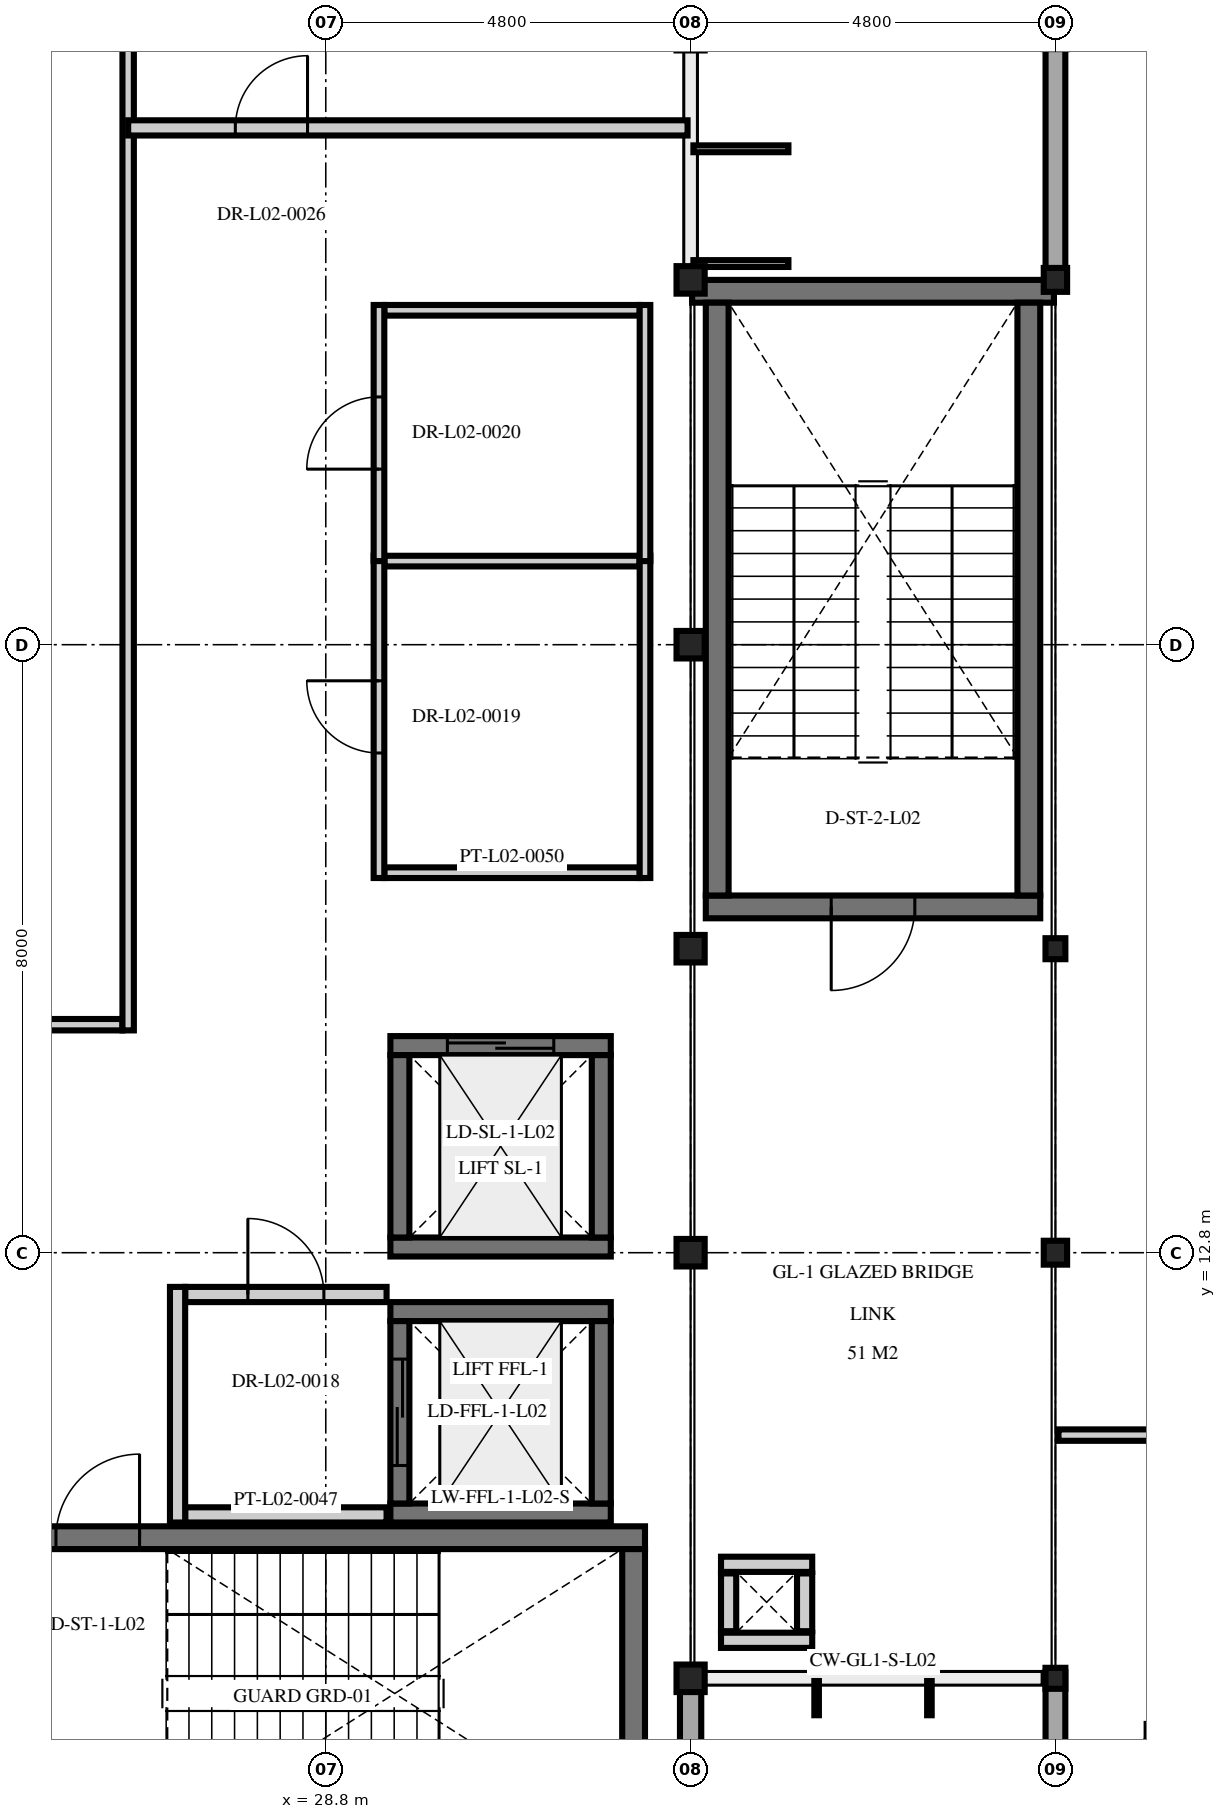
"""IFC4 building model, lengths in metres.
Left out: names, types, materials, properties, quantities, classifications, styles, units other than length and angle.
Written with IfcOpenShell. Run it as: python <this file> out.ifc"""

import sys

from ifc_helpers import new_model, si_unit, direction, frame, frame_2d, origin, origin_2d, place, context, subcontext, project, spatial, rectangle, i_section, extrude, element, fill, save


model = new_model("IFC4")
c1 = context("Model", 3, precision=1e-05, world=origin(), true_north=direction((0.0, 1.0)))
c2 = subcontext(c1, "Body", "Model", "MODEL_VIEW")
j1 = project(units=[si_unit("LENGTHUNIT", "METRE"), si_unit("PLANEANGLEUNIT", "RADIAN")], contexts=[c1])
p1 = place(None, origin())
s1 = spatial("IfcSite", under=j1, at=p1, CompositionType="ELEMENT")
p2 = place(p1, origin())
s2 = spatial("IfcBuilding", under=s1, at=p2, CompositionType="ELEMENT")
p3 = place(p2, frame((0.0, 0.0, 9.6)))
s3 = spatial("IfcBuildingStorey", under=s2, at=p3, CompositionType="ELEMENT", Elevation=9.6)
for number, where, z_axis, x_axis in (
    (1, (33.6, 7.2, 0.0), (0.0, 0.0, 1.0), (1.0, 0.0, 0.0)),
    (2, (33.6, 12.8, 0.0), (0.0, 0.0, 1.0), (1.0, 0.0, 0.0)),
    (3, (33.6, 16.8, 0.0), (0.0, 0.0, 1.0), (1.0, 0.0, 0.0)),
    (4, (33.6, 20.8, 0.0), (0.0, 0.0, 1.0), (1.0, 0.0, 0.0)),
    (5, (33.6, 25.6, 0.0), (0.0, 0.0, 1.0), (1.0, 0.0, 0.0)),
):
    element("IfcColumn", number, at=place(p3, frame(where, z_axis=z_axis, x_axis=x_axis)), inside=s3, PredefinedType="COLUMN", context=c2, shape_type="SweptSolid", body=[
        extrude(i_section(OverallWidth=0.371, OverallDepth=0.362, WebThickness=0.012, FlangeThickness=0.021, at=origin_2d()), origin(), (0.0, 0.0, 1.0), 4.5),
    ])
for number, where, z_axis, x_axis in (
    (6, (38.4, 12.8, 0.0), (0.0, 0.0, 1.0), (1.0, 0.0, 0.0)),
    (7, (38.4, 25.6, 0.0), (0.0, 0.0, 1.0), (1.0, 0.0, 0.0)),
):
    element("IfcColumn", number, at=place(p3, frame(where, z_axis=z_axis, x_axis=x_axis)), inside=s3, PredefinedType="COLUMN", context=c2, shape_type="SweptSolid", body=[
        extrude(i_section(OverallWidth=0.307, OverallDepth=0.314, WebThickness=0.012, FlangeThickness=0.019, at=origin_2d()), origin(), (0.0, 0.0, 1.0), 4.5),
    ])
for number, where, z_axis, x_axis in (
    (8, (38.4, 7.2, 0.0), (0.0, 0.0, 1.0), (1.0, 0.0, 0.0)),
    (9, (38.4, 16.8, 0.0), (0.0, 0.0, 1.0), (1.0, 0.0, 0.0)),
):
    element("IfcColumn", number, at=place(p3, frame(where, z_axis=z_axis, x_axis=x_axis)), inside=s3, PredefinedType="COLUMN", context=c2, shape_type="SweptSolid", body=[
        extrude(i_section(OverallWidth=0.261, OverallDepth=0.276, WebThickness=0.015, FlangeThickness=0.025, at=origin_2d()), origin(), (0.0, 0.0, 1.0), 4.5),
    ])
p4 = place(p3, frame((24.6, 9.05, 0.0), z_axis=(0.0, 0.0, 1.0), x_axis=(1.0, 0.0, 0.0)))
e10 = element("IfcWall", 10, at=p4, inside=s3, PredefinedType="SHEAR", context=c2, shape_type="SweptSolid", body=[
    extrude(rectangle(XDim=8.4, YDim=0.3, at=frame_2d((4.2, 0.0))), origin(), (0.0, 0.0, 1.0), 4.26),
])
p5 = place(p4, frame((0.65, 0.0, 0.0)))
e11 = element("IfcOpeningElement", 11, at=p5, cuts=e10, PredefinedType="OPENING", context=c2, shape_type="SweptSolid", body=[
    extrude(rectangle(XDim=1.1, YDim=2.2, at=frame_2d((0.55, 1.1))), frame((0.0, 0.16, 0.0), z_axis=(0.0, -1.0, 0.0), x_axis=(1.0, 0.0, 0.0)), (0.0, 0.0, 1.0), 0.32),
])
p6 = place(p3, frame((32.85, 8.9, 0.0), z_axis=(0.0, 0.0, 1.0), x_axis=(0.0, -1.0, 0.0)))
e12 = element("IfcWall", 12, at=p6, inside=s3, PredefinedType="SHEAR", context=c2, shape_type="SweptSolid", body=[
    extrude(rectangle(XDim=3.8, YDim=0.3, at=frame_2d((1.9, 0.0))), origin(), (0.0, 0.0, 1.0), 4.26),
])
p7 = place(p3, frame((38.2, 17.35, 0.0), z_axis=(0.0, 0.0, 1.0), x_axis=(-1.0, 0.0, 0.0)))
e13 = element("IfcWall", 13, at=p7, inside=s3, PredefinedType="SHEAR", context=c2, shape_type="SweptSolid", body=[
    extrude(rectangle(XDim=4.4, YDim=0.3, at=frame_2d((2.2, 0.0))), origin(), (0.0, 0.0, 1.0), 4.26),
])
p8 = place(p7, frame((1.65, 0.0, 0.0)))
e14 = element("IfcOpeningElement", 14, at=p8, cuts=e13, PredefinedType="OPENING", context=c2, shape_type="SweptSolid", body=[
    extrude(rectangle(XDim=1.1, YDim=2.2, at=frame_2d((0.55, 1.1))), frame((0.0, 0.16, 0.0), z_axis=(0.0, -1.0, 0.0), x_axis=(1.0, 0.0, 0.0)), (0.0, 0.0, 1.0), 0.32),
])
p9 = place(p3, frame((33.62, 25.45, 0.0), z_axis=(0.0, 0.0, 1.0), x_axis=(1.0, 0.0, 0.0)))
e15 = element("IfcWall", 15, at=p9, inside=s3, PredefinedType="SHEAR", context=c2, shape_type="SweptSolid", body=[
    extrude(rectangle(XDim=4.76, YDim=0.3, at=frame_2d((2.38, 0.0))), origin(), (0.0, 0.0, 1.0), 4.26),
])
for number, where, z_axis, x_axis in (
    (16, (33.95, 17.5, 0.0), (0.0, 0.0, 1.0), (0.0, 1.0, 0.0)),
    (17, (38.05, 25.3, 0.0), (0.0, 0.0, 1.0), (0.0, -1.0, 0.0)),
):
    element("IfcWall", number, at=place(p3, frame(where, z_axis=z_axis, x_axis=x_axis)), inside=s3, PredefinedType="SHEAR", context=c2, shape_type="SweptSolid", body=[
        extrude(rectangle(XDim=7.8, YDim=0.3, at=frame_2d((3.9, 0.0))), origin(), (0.0, 0.0, 1.0), 4.26),
    ])
for number, where, z_axis, x_axis in (
    (18, (32.55, 9.375, 0.0), (0.0, 0.0, 1.0), (-1.0, 0.0, 0.0)),
    (19, (29.65, 12.025, 0.0), (0.0, 0.0, 1.0), (1.0, 0.0, 0.0)),
):
    element("IfcWall", number, at=place(p3, frame(where, z_axis=z_axis, x_axis=x_axis)), inside=s3, PredefinedType="SHEAR", context=c2, shape_type="SweptSolid", body=[
        extrude(rectangle(XDim=2.9, YDim=0.25, at=frame_2d((1.45, 0.0))), origin(), (0.0, 0.0, 1.0), 4.26),
    ])
p10 = place(p3, frame((29.775, 9.5, 0.0), z_axis=(0.0, 0.0, 1.0), x_axis=(0.0, 1.0, 0.0)))
e20 = element("IfcWall", 20, at=p10, inside=s3, PredefinedType="SHEAR", context=c2, shape_type="SweptSolid", body=[
    extrude(rectangle(XDim=2.4, YDim=0.25, at=frame_2d((1.2, 0.0))), origin(), (0.0, 0.0, 1.0), 4.26),
])
p11 = place(p10, frame((0.5, 0.0, 0.0)))
e21 = element("IfcOpeningElement", 21, at=p11, cuts=e20, PredefinedType="OPENING", context=c2, shape_type="SweptSolid", body=[
    extrude(rectangle(XDim=1.4, YDim=2.2, at=frame_2d((0.7, 1.1))), frame((0.0, 0.135, 0.0), z_axis=(0.0, -1.0, 0.0), x_axis=(1.0, 0.0, 0.0)), (0.0, 0.0, 1.0), 0.27),
])
p12 = place(p3, frame((32.425, 11.9, 0.0), z_axis=(0.0, 0.0, 1.0), x_axis=(0.0, -1.0, 0.0)))
e22 = element("IfcWall", 22, at=p12, inside=s3, PredefinedType="SHEAR", context=c2, shape_type="SweptSolid", body=[
    extrude(rectangle(XDim=2.4, YDim=0.25, at=frame_2d((1.2, 0.0))), origin(), (0.0, 0.0, 1.0), 4.26),
])
p13 = place(p3, frame((32.55, 12.875, 0.0), z_axis=(0.0, 0.0, 1.0), x_axis=(-1.0, 0.0, 0.0)))
e23 = element("IfcWall", 23, at=p13, inside=s3, PredefinedType="SHEAR", context=c2, shape_type="SweptSolid", body=[
    extrude(rectangle(XDim=2.9, YDim=0.25, at=frame_2d((1.45, 0.0))), origin(), (0.0, 0.0, 1.0), 4.26),
])
p14 = place(p3, frame((29.65, 15.525, 0.0), z_axis=(0.0, 0.0, 1.0), x_axis=(1.0, 0.0, 0.0)))
e24 = element("IfcWall", 24, at=p14, inside=s3, PredefinedType="SHEAR", context=c2, shape_type="SweptSolid", body=[
    extrude(rectangle(XDim=2.9, YDim=0.25, at=frame_2d((1.45, 0.0))), origin(), (0.0, 0.0, 1.0), 4.26),
])
p15 = place(p14, frame((0.75, 0.0, 0.0)))
e25 = element("IfcOpeningElement", 25, at=p15, cuts=e24, PredefinedType="OPENING", context=c2, shape_type="SweptSolid", body=[
    extrude(rectangle(XDim=1.4, YDim=2.2, at=frame_2d((0.7, 1.1))), frame((0.0, 0.135, 0.0), z_axis=(0.0, -1.0, 0.0), x_axis=(1.0, 0.0, 0.0)), (0.0, 0.0, 1.0), 0.27),
])
for number, where, z_axis, x_axis in (
    (26, (29.775, 13.0, 0.0), (0.0, 0.0, 1.0), (0.0, 1.0, 0.0)),
    (27, (32.425, 15.4, 0.0), (0.0, 0.0, 1.0), (0.0, -1.0, 0.0)),
):
    element("IfcWall", number, at=place(p3, frame(where, z_axis=z_axis, x_axis=x_axis)), inside=s3, PredefinedType="SHEAR", context=c2, shape_type="SweptSolid", body=[
        extrude(rectangle(XDim=2.4, YDim=0.25, at=frame_2d((1.2, 0.0))), origin(), (0.0, 0.0, 1.0), 4.26),
    ])
for number, where, z_axis, x_axis in (
    (28, (35.2, 7.7, 0.0), (0.0, 0.0, 1.0), (-1.0, 0.0, 0.0)),
    (29, (34.0, 8.7, 0.0), (0.0, 0.0, 1.0), (1.0, 0.0, 0.0)),
):
    element("IfcWall", number, at=place(p3, frame(where, z_axis=z_axis, x_axis=x_axis)), inside=s3, PredefinedType="PARTITIONING", context=c2, shape_type="SweptSolid", body=[
        extrude(rectangle(XDim=1.2, YDim=0.2, at=frame_2d((0.6, 0.0))), origin(), (0.0, 0.0, 1.0), 3.76),
    ])
for number, where, z_axis, x_axis in (
    (30, (34.1, 7.82, 0.0), (0.0, 0.0, 1.0), (0.0, 1.0, 0.0)),
    (31, (35.1, 8.58, 0.0), (0.0, 0.0, 1.0), (0.0, -1.0, 0.0)),
):
    element("IfcWall", number, at=place(p3, frame(where, z_axis=z_axis, x_axis=x_axis)), inside=s3, PredefinedType="PARTITIONING", context=c2, shape_type="SweptSolid", body=[
        extrude(rectangle(XDim=0.76, YDim=0.2, at=frame_2d((0.38, 0.0))), origin(), (0.0, 0.0, 1.0), 3.76),
    ])
p16 = place(p3, frame((33.6, 7.285, 0.0), z_axis=(0.0, 0.0, 1.0), x_axis=(0.0, -1.0, 0.0)))
e32 = element("IfcWall", 32, at=p16, inside=s3, PredefinedType="SOLIDWALL", context=c2, shape_type="SweptSolid", body=[
    extrude(rectangle(XDim=2.57, YDim=0.28, at=frame_2d((1.285, 0.0))), origin(), (0.0, 0.0, 1.0), 3.685),
])
p17 = place(p3, frame((38.4, 4.715, 0.0), z_axis=(0.0, 0.0, 1.0), x_axis=(0.0, 1.0, 0.0)))
e33 = element("IfcWall", 33, at=p17, inside=s3, PredefinedType="SOLIDWALL", context=c2, shape_type="SweptSolid", body=[
    extrude(rectangle(XDim=2.57, YDim=0.26, at=frame_2d((1.285, 0.0))), origin(), (0.0, 0.0, 1.0), 3.845),
])
p18 = place(p3, frame((38.4, 25.515, 0.0), z_axis=(0.0, 0.0, 1.0), x_axis=(0.0, 1.0, 0.0)))
e34 = element("IfcWall", 34, at=p18, inside=s3, PredefinedType="SOLIDWALL", context=c2, shape_type="SweptSolid", body=[
    extrude(rectangle(XDim=11.37, YDim=0.26, at=frame_2d((5.685, 0.0))), origin(), (0.0, 0.0, 1.0), 3.845),
])
p19 = place(p3, frame((26.95, 9.35, 0.0), z_axis=(0.0, 0.0, 1.0), x_axis=(1.0, 0.0, 0.0)))
e35 = element("IfcWall", 35, at=p19, inside=s3, PredefinedType="PARTITIONING", context=c2, shape_type="SweptSolid", body=[
    extrude(rectangle(XDim=2.65, YDim=0.2, at=frame_2d((1.325, 0.0))), origin(), (0.0, 0.0, 1.0), 4.26),
])
p20 = place(p3, frame((26.95, 12.25, 0.0), z_axis=(0.0, 0.0, 1.0), x_axis=(1.0, 0.0, 0.0)))
e36 = element("IfcWall", 36, at=p20, inside=s3, PredefinedType="PARTITIONING", context=c2, shape_type="SweptSolid", body=[
    extrude(rectangle(XDim=2.65, YDim=0.2, at=frame_2d((1.325, 0.0))), origin(), (0.0, 0.0, 1.0), 4.26),
])
p21 = place(p20, frame((0.825, 0.0, 0.0)))
e37 = element("IfcOpeningElement", 37, at=p21, cuts=e36, PredefinedType="OPENING", context=c2, shape_type="SweptSolid", body=[
    extrude(rectangle(XDim=1.0, YDim=2.2, at=frame_2d((0.5, 1.1))), frame((0.0, 0.11, 0.0), z_axis=(0.0, -1.0, 0.0), x_axis=(1.0, 0.0, 0.0)), (0.0, 0.0, 1.0), 0.22),
])
p22 = place(p3, frame((26.85, 9.25, 0.0), z_axis=(0.0, 0.0, 1.0), x_axis=(0.0, 1.0, 0.0)))
e38 = element("IfcWall", 38, at=p22, inside=s3, PredefinedType="PARTITIONING", context=c2, shape_type="SweptSolid", body=[
    extrude(rectangle(XDim=3.1, YDim=0.2, at=frame_2d((1.55, 0.0))), origin(), (0.0, 0.0, 1.0), 4.26),
])
for number, where, z_axis, x_axis in (
    (39, (29.57, 17.8, 0.0), (0.0, 0.0, 1.0), (1.0, 0.0, 0.0)),
    (40, (29.57, 21.9, 0.0), (0.0, 0.0, 1.0), (1.0, 0.0, 0.0)),
):
    element("IfcWall", number, at=place(p3, frame(where, z_axis=z_axis, x_axis=x_axis)), inside=s3, PredefinedType="PARTITIONING", context=c2, shape_type="SweptSolid", body=[
        extrude(rectangle(XDim=3.36, YDim=0.14, at=frame_2d((1.68, 0.0))), origin(), (0.0, 0.0, 1.0), 3.835),
    ])
p23 = place(p3, frame((29.5, 17.73, 0.0), z_axis=(0.0, 0.0, 1.0), x_axis=(0.0, 1.0, 0.0)))
e41 = element("IfcWall", 41, at=p23, inside=s3, PredefinedType="PARTITIONING", context=c2, shape_type="SweptSolid", body=[
    extrude(rectangle(XDim=4.24, YDim=0.14, at=frame_2d((2.12, 0.0))), origin(), (0.0, 0.0, 1.0), 3.685),
])
p24 = place(p23, frame((1.645, 0.0, 0.0)))
e42 = element("IfcOpeningElement", 42, at=p24, cuts=e41, PredefinedType="OPENING", context=c2, shape_type="SweptSolid", body=[
    extrude(rectangle(XDim=0.95, YDim=2.1, at=frame_2d((0.475, 1.05))), frame((0.0, 0.08, 0.0), z_axis=(0.0, -1.0, 0.0), x_axis=(1.0, 0.0, 0.0)), (0.0, 0.0, 1.0), 0.16),
])
p25 = place(p3, frame((33.0, 17.73, 0.0), z_axis=(0.0, 0.0, 1.0), x_axis=(0.0, 1.0, 0.0)))
e43 = element("IfcWall", 43, at=p25, inside=s3, PredefinedType="PARTITIONING", context=c2, shape_type="SweptSolid", body=[
    extrude(rectangle(XDim=4.24, YDim=0.14, at=frame_2d((2.12, 0.0))), origin(), (0.0, 0.0, 1.0), 3.685),
])
p26 = place(p3, frame((29.57, 25.2, 0.0), z_axis=(0.0, 0.0, 1.0), x_axis=(1.0, 0.0, 0.0)))
e44 = element("IfcWall", 44, at=p26, inside=s3, PredefinedType="PARTITIONING", context=c2, shape_type="SweptSolid", body=[
    extrude(rectangle(XDim=3.36, YDim=0.14, at=frame_2d((1.68, 0.0))), origin(), (0.0, 0.0, 1.0), 3.835),
])
p27 = place(p3, frame((29.5, 21.9, 0.0), z_axis=(0.0, 0.0, 1.0), x_axis=(0.0, 1.0, 0.0)))
e45 = element("IfcWall", 45, at=p27, inside=s3, PredefinedType="PARTITIONING", context=c2, shape_type="SweptSolid", body=[
    extrude(rectangle(XDim=3.37, YDim=0.14, at=frame_2d((1.685, 0.0))), origin(), (0.0, 0.0, 1.0), 4.26),
])
p28 = place(p27, frame((1.21, 0.0, 0.0)))
e46 = element("IfcOpeningElement", 46, at=p28, cuts=e45, PredefinedType="OPENING", context=c2, shape_type="SweptSolid", body=[
    extrude(rectangle(XDim=0.95, YDim=2.1, at=frame_2d((0.475, 1.05))), frame((0.0, 0.08, 0.0), z_axis=(0.0, -1.0, 0.0), x_axis=(1.0, 0.0, 0.0)), (0.0, 0.0, 1.0), 0.16),
])
p29 = place(p3, frame((33.0, 21.9, 0.0), z_axis=(0.0, 0.0, 1.0), x_axis=(0.0, 1.0, 0.0)))
e47 = element("IfcWall", 47, at=p29, inside=s3, PredefinedType="PARTITIONING", context=c2, shape_type="SweptSolid", body=[
    extrude(rectangle(XDim=3.37, YDim=0.14, at=frame_2d((1.685, 0.0))), origin(), (0.0, 0.0, 1.0), 4.26),
])
p30 = place(p3, frame((9.675, 15.8, 0.0), z_axis=(0.0, 0.0, 1.0), x_axis=(1.0, 0.0, 0.0)))
e48 = element("IfcWall", 48, at=p30, inside=s3, PredefinedType="PARTITIONING", context=c2, shape_type="SweptSolid", body=[
    extrude(rectangle(XDim=16.45, YDim=0.15, at=frame_2d((8.225, 0.0))), origin(), (0.0, 0.0, 1.0), 3.785),
])
p31 = place(p3, frame((26.2, 15.725, 0.0), z_axis=(0.0, 0.0, 1.0), x_axis=(0.0, 1.0, 0.0)))
e49 = element("IfcWall", 49, at=p31, inside=s3, PredefinedType="PARTITIONING", context=c2, shape_type="SweptSolid", body=[
    extrude(rectangle(XDim=21.035, YDim=0.15, at=frame_2d((10.518, 0.0))), origin(), (0.0, 0.0, 1.0), 3.685),
])
p32 = place(p3, frame((26.2, 27.6, 0.0), z_axis=(0.0, 0.0, 1.0), x_axis=(1.0, 0.0, 0.0)))
e50 = element("IfcWall", 50, at=p32, inside=s3, PredefinedType="PARTITIONING", context=c2, shape_type="SweptSolid", body=[
    extrude(rectangle(XDim=7.36, YDim=0.2, at=frame_2d((3.68, 0.0))), origin(), (0.0, 0.0, 1.0), 3.785),
])
p33 = place(p32, frame((1.41, 0.0, 0.0)))
e51 = element("IfcOpeningElement", 51, at=p33, cuts=e50, PredefinedType="OPENING", context=c2, shape_type="SweptSolid", body=[
    extrude(rectangle(XDim=0.95, YDim=2.15, at=frame_2d((0.475, 1.075))), frame((0.0, 0.11, 0.0), z_axis=(0.0, -1.0, 0.0), x_axis=(1.0, 0.0, 0.0)), (0.0, 0.0, 1.0), 0.22),
])
p34 = place(p3, frame((38.44, 10.4, 0.0), z_axis=(0.0, 0.0, 1.0), x_axis=(1.0, 0.0, 0.0)))
e52 = element("IfcWall", 52, at=p34, inside=s3, PredefinedType="PARTITIONING", context=c2, shape_type="SweptSolid", body=[
    extrude(rectangle(XDim=9.485, YDim=0.15, at=frame_2d((4.743, 0.0))), origin(), (0.0, 0.0, 1.0), 3.955),
])
p35 = place(p34, frame((4.268, 0.0, 0.0)))
e53 = element("IfcOpeningElement", 53, at=p35, cuts=e52, PredefinedType="OPENING", context=c2, shape_type="SweptSolid", body=[
    extrude(rectangle(XDim=0.95, YDim=2.15, at=frame_2d((0.475, 1.075))), frame((0.0, 0.085, 0.0), z_axis=(0.0, -1.0, 0.0), x_axis=(1.0, 0.0, 0.0)), (0.0, 0.0, 1.0), 0.17),
])
p36 = place(p5, origin())
e54 = element("IfcDoor", 54, at=p36, inside=s3, OperationType="SINGLE_SWING_RIGHT", PredefinedType="DOOR", context=c2, shape_type="SweptSolid", body=[
    extrude(rectangle(XDim=1.1, YDim=2.2, at=frame_2d((0.55, 1.1))), frame((0.0, 0.025, 0.0), z_axis=(0.0, -1.0, 0.0), x_axis=(1.0, 0.0, 0.0)), (0.0, 0.0, 1.0), 0.05),
])
fill(e11, e54)
p37 = place(p8, origin())
e55 = element("IfcDoor", 55, at=p37, inside=s3, OperationType="SINGLE_SWING_RIGHT", PredefinedType="DOOR", context=c2, shape_type="SweptSolid", body=[
    extrude(rectangle(XDim=1.1, YDim=2.2, at=frame_2d((0.55, 1.1))), frame((0.0, 0.025, 0.0), z_axis=(0.0, -1.0, 0.0), x_axis=(1.0, 0.0, 0.0)), (0.0, 0.0, 1.0), 0.05),
])
fill(e14, e55)
p38 = place(p11, origin())
e56 = element("IfcDoor", 56, at=p38, inside=s3, OperationType="DOUBLE_DOOR_SLIDING", PredefinedType="DOOR", context=c2, shape_type="SweptSolid", body=[
    extrude(rectangle(XDim=1.4, YDim=2.2, at=frame_2d((0.7, 1.1))), frame((0.0, 0.025, 0.0), z_axis=(0.0, -1.0, 0.0), x_axis=(1.0, 0.0, 0.0)), (0.0, 0.0, 1.0), 0.05),
])
fill(e21, e56)
p39 = place(p15, origin())
e57 = element("IfcDoor", 57, at=p39, inside=s3, OperationType="DOUBLE_DOOR_SLIDING", PredefinedType="DOOR", context=c2, shape_type="SweptSolid", body=[
    extrude(rectangle(XDim=1.4, YDim=2.2, at=frame_2d((0.7, 1.1))), frame((0.0, 0.025, 0.0), z_axis=(0.0, -1.0, 0.0), x_axis=(1.0, 0.0, 0.0)), (0.0, 0.0, 1.0), 0.05),
])
fill(e25, e57)
p40 = place(p21, origin())
e58 = element("IfcDoor", 58, at=p40, inside=s3, OperationType="SINGLE_SWING_LEFT", PredefinedType="DOOR", context=c2, shape_type="SweptSolid", body=[
    extrude(rectangle(XDim=1.0, YDim=2.2, at=frame_2d((0.5, 1.1))), frame((0.0, 0.025, 0.0), z_axis=(0.0, -1.0, 0.0), x_axis=(1.0, 0.0, 0.0)), (0.0, 0.0, 1.0), 0.05),
])
fill(e37, e58)
p41 = place(p24, origin())
e59 = element("IfcDoor", 59, at=p41, inside=s3, OperationType="SINGLE_SWING_RIGHT", PredefinedType="DOOR", context=c2, shape_type="SweptSolid", body=[
    extrude(rectangle(XDim=0.95, YDim=2.1, at=frame_2d((0.475, 1.05))), frame((0.0, 0.025, 0.0), z_axis=(0.0, -1.0, 0.0), x_axis=(1.0, 0.0, 0.0)), (0.0, 0.0, 1.0), 0.05),
])
fill(e42, e59)
p42 = place(p28, origin())
e60 = element("IfcDoor", 60, at=p42, inside=s3, OperationType="SINGLE_SWING_LEFT", PredefinedType="DOOR", context=c2, shape_type="SweptSolid", body=[
    extrude(rectangle(XDim=0.95, YDim=2.1, at=frame_2d((0.475, 1.05))), frame((0.0, 0.025, 0.0), z_axis=(0.0, -1.0, 0.0), x_axis=(1.0, 0.0, 0.0)), (0.0, 0.0, 1.0), 0.05),
])
fill(e46, e60)
p43 = place(p33, origin())
e61 = element("IfcDoor", 61, at=p43, inside=s3, OperationType="SINGLE_SWING_RIGHT", PredefinedType="DOOR", context=c2, shape_type="SweptSolid", body=[
    extrude(rectangle(XDim=0.95, YDim=2.15, at=frame_2d((0.475, 1.075))), frame((0.0, 0.025, 0.0), z_axis=(0.0, -1.0, 0.0), x_axis=(1.0, 0.0, 0.0)), (0.0, 0.0, 1.0), 0.05),
])
fill(e51, e61)
save(model, sys.argv[1])
